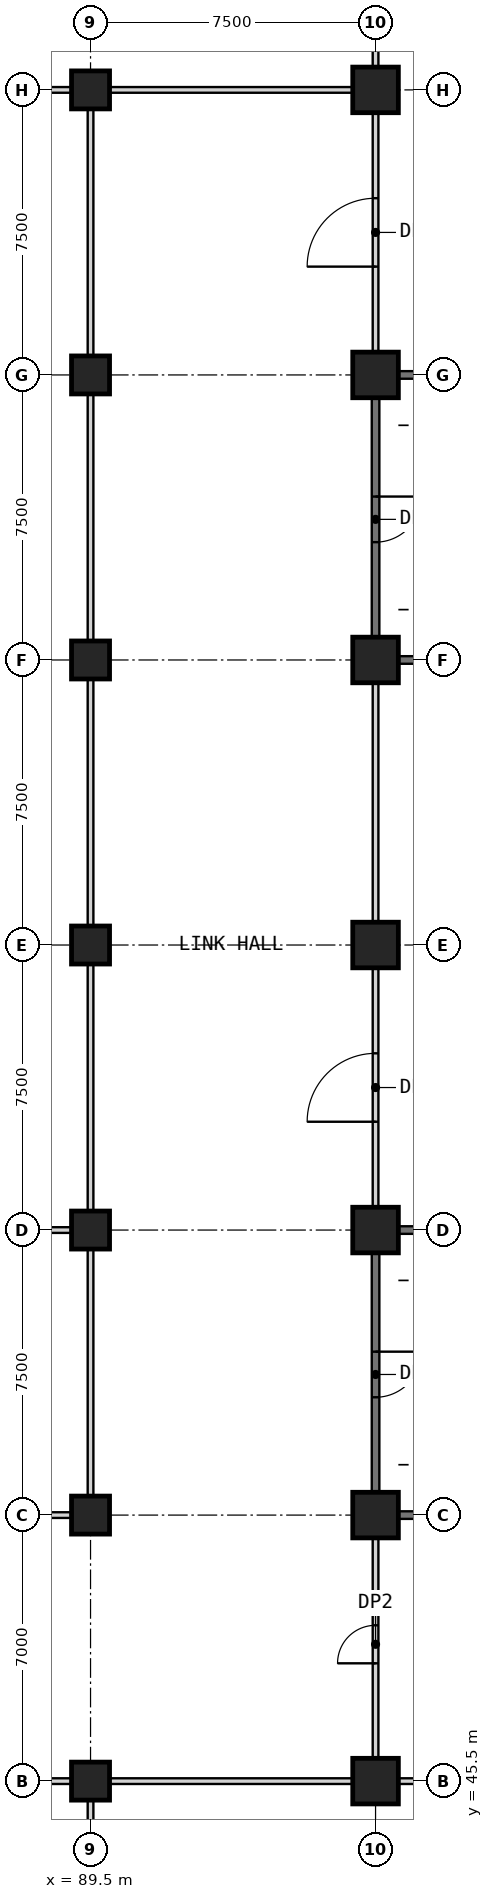
"""IFC4 building model, lengths in metres.
Left out: names, types, materials, properties, quantities, classifications, styles, units other than length and angle.
Written with IfcOpenShell. Run it as: python <this file> out.ifc"""

import sys

from ifc_helpers import new_model, si_unit, direction, frame, frame_2d, origin, origin_2d, place, context, subcontext, project, spatial, rectangle, extrude, element, fill, save


model = new_model("IFC4")
c1 = context("Model", 3, precision=1e-05, world=origin(), true_north=direction((0.0, 1.0)))
c2 = subcontext(c1, "Body", "Model", "MODEL_VIEW")
j1 = project(units=[si_unit("LENGTHUNIT", "METRE"), si_unit("PLANEANGLEUNIT", "RADIAN")], contexts=[c1])
p1 = place(None, origin())
s1 = spatial("IfcSite", under=j1, at=p1, CompositionType="ELEMENT")
p2 = place(p1, origin())
s2 = spatial("IfcBuilding", under=s1, at=p2, CompositionType="ELEMENT")
p3 = place(p2, frame((0.0, 0.0, 29.0)))
s3 = spatial("IfcBuildingStorey", under=s2, at=p3, CompositionType="ELEMENT", Elevation=29.0)
for number, where, z_axis, x_axis in (
    (1, (89.5, 45.5, 0.0), (0.0, 0.0, 1.0), (1.0, 0.0, 0.0)),
    (2, (89.5, 52.5, 0.0), (0.0, 0.0, 1.0), (1.0, 0.0, 0.0)),
    (3, (89.5, 60.0, 0.0), (0.0, 0.0, 1.0), (1.0, 0.0, 0.0)),
    (4, (89.5, 67.5, 0.0), (0.0, 0.0, 1.0), (1.0, 0.0, 0.0)),
    (5, (89.5, 75.0, 0.0), (0.0, 0.0, 1.0), (1.0, 0.0, 0.0)),
    (6, (89.5, 82.5, 0.0), (0.0, 0.0, 1.0), (1.0, 0.0, 0.0)),
    (7, (89.5, 90.0, 0.0), (0.0, 0.0, 1.0), (1.0, 0.0, 0.0)),
):
    element("IfcColumn", number, at=place(p3, frame(where, z_axis=z_axis, x_axis=x_axis)), inside=s3, PredefinedType="COLUMN", context=c2, shape_type="SweptSolid", body=[
        extrude(rectangle(XDim=1.0, YDim=1.0, at=origin_2d()), origin(), (0.0, 0.0, 1.0), 5.0),
    ])
for number, where, z_axis, x_axis in (
    (8, (97.0, 45.5, 0.0), (0.0, 0.0, 1.0), (1.0, 0.0, 0.0)),
    (9, (97.0, 52.5, 0.0), (0.0, 0.0, 1.0), (1.0, 0.0, 0.0)),
    (10, (97.0, 60.0, 0.0), (0.0, 0.0, 1.0), (1.0, 0.0, 0.0)),
    (11, (97.0, 67.5, 0.0), (0.0, 0.0, 1.0), (1.0, 0.0, 0.0)),
    (12, (97.0, 75.0, 0.0), (0.0, 0.0, 1.0), (1.0, 0.0, 0.0)),
    (13, (97.0, 82.5, 0.0), (0.0, 0.0, 1.0), (1.0, 0.0, 0.0)),
    (14, (97.0, 90.0, 0.0), (0.0, 0.0, 1.0), (1.0, 0.0, 0.0)),
):
    element("IfcColumn", number, at=place(p3, frame(where, z_axis=z_axis, x_axis=x_axis)), inside=s3, PredefinedType="COLUMN", context=c2, shape_type="SweptSolid", body=[
        extrude(rectangle(XDim=1.2, YDim=1.2, at=origin_2d()), origin(), (0.0, 0.0, 1.0), 5.0),
    ])
for number, where, z_axis, x_axis in (
    (15, (82.6, 45.5, 0.0), (0.0, 0.0, 1.0), (1.0, 0.0, 0.0)),
    (16, (90.0, 45.5, 0.0), (0.0, 0.0, 1.0), (1.0, 0.0, 0.0)),
):
    element("IfcWall", number, at=place(p3, frame(where, z_axis=z_axis, x_axis=x_axis)), inside=s3, PredefinedType="PARTITIONING", context=c2, shape_type="SweptSolid", body=[
        extrude(rectangle(XDim=6.4, YDim=0.15, at=frame_2d((3.2, 0.0))), origin(), (0.0, 0.0, 1.0), 4.7),
    ])
p4 = place(p3, frame((97.6, 45.5, 0.0), z_axis=(0.0, 0.0, 1.0), x_axis=(1.0, 0.0, 0.0)))
e17 = element("IfcWall", 17, at=p4, inside=s3, PredefinedType="PARTITIONING", context=c2, shape_type="SweptSolid", body=[
    extrude(rectangle(XDim=6.3, YDim=0.15, at=frame_2d((3.15, 0.0))), origin(), (0.0, 0.0, 1.0), 4.7),
])
p5 = place(p4, frame((2.25, 0.0, 0.0)))
e18 = element("IfcOpeningElement", 18, at=p5, cuts=e17, PredefinedType="OPENING", context=c2, shape_type="SweptSolid", body=[
    extrude(rectangle(XDim=1.8, YDim=2.4, at=frame_2d((0.9, 1.2))), frame((0.0, 0.085, 0.0), z_axis=(0.0, -1.0, 0.0), x_axis=(1.0, 0.0, 0.0)), (0.0, 0.0, 1.0), 0.17),
])
p6 = place(p3, frame((89.0, 52.5, 0.0), z_axis=(0.0, 0.0, 1.0), x_axis=(-1.0, 0.0, 0.0)))
e19 = element("IfcWall", 19, at=p6, inside=s3, PredefinedType="PARTITIONING", context=c2, shape_type="SweptSolid", body=[
    extrude(rectangle(XDim=6.4, YDim=0.15, at=frame_2d((3.2, 0.0))), origin(), (0.0, 0.0, 1.0), 4.7),
])
p7 = place(p6, frame((2.35, 0.0, 0.0)))
e20 = element("IfcOpeningElement", 20, at=p7, cuts=e19, PredefinedType="OPENING", context=c2, shape_type="SweptSolid", body=[
    extrude(rectangle(XDim=1.8, YDim=2.4, at=frame_2d((0.9, 1.2))), frame((0.0, 0.085, 0.0), z_axis=(0.0, -1.0, 0.0), x_axis=(1.0, 0.0, 0.0)), (0.0, 0.0, 1.0), 0.17),
])
p8 = place(p3, frame((97.6, 52.5, 0.0), z_axis=(0.0, 0.0, 1.0), x_axis=(1.0, 0.0, 0.0)))
e21 = element("IfcWall", 21, at=p8, inside=s3, PredefinedType="SHEAR", context=c2, shape_type="SweptSolid", body=[
    extrude(rectangle(XDim=6.3, YDim=0.2, at=frame_2d((3.15, 0.0))), origin(), (0.0, 0.0, 1.0), 4.7),
])
p9 = place(p3, frame((82.6, 60.0, 0.0), z_axis=(0.0, 0.0, 1.0), x_axis=(1.0, 0.0, 0.0)))
e22 = element("IfcWall", 22, at=p9, inside=s3, PredefinedType="PARTITIONING", context=c2, shape_type="SweptSolid", body=[
    extrude(rectangle(XDim=6.4, YDim=0.15, at=frame_2d((3.2, 0.0))), origin(), (0.0, 0.0, 1.0), 4.7),
])
for number, where, z_axis, x_axis in (
    (23, (97.6, 60.0, 0.0), (0.0, 0.0, 1.0), (1.0, 0.0, 0.0)),
    (24, (97.6, 75.0, 0.0), (0.0, 0.0, 1.0), (1.0, 0.0, 0.0)),
    (25, (97.6, 82.5, 0.0), (0.0, 0.0, 1.0), (1.0, 0.0, 0.0)),
):
    element("IfcWall", number, at=place(p3, frame(where, z_axis=z_axis, x_axis=x_axis)), inside=s3, PredefinedType="SHEAR", context=c2, shape_type="SweptSolid", body=[
        extrude(rectangle(XDim=6.3, YDim=0.2, at=frame_2d((3.15, 0.0))), origin(), (0.0, 0.0, 1.0), 4.7),
    ])
for number, where, z_axis, x_axis in (
    (26, (82.6, 90.0, 0.0), (0.0, 0.0, 1.0), (1.0, 0.0, 0.0)),
    (27, (90.0, 90.0, 0.0), (0.0, 0.0, 1.0), (1.0, 0.0, 0.0)),
):
    element("IfcWall", number, at=place(p3, frame(where, z_axis=z_axis, x_axis=x_axis)), inside=s3, PredefinedType="PARTITIONING", context=c2, shape_type="SweptSolid", body=[
        extrude(rectangle(XDim=6.4, YDim=0.15, at=frame_2d((3.2, 0.0))), origin(), (0.0, 0.0, 1.0), 4.7),
    ])
p10 = place(p3, frame((97.0, 46.1, 0.0), z_axis=(0.0, 0.0, 1.0), x_axis=(0.0, 1.0, 0.0)))
e28 = element("IfcWall", 28, at=p10, inside=s3, PredefinedType="PARTITIONING", context=c2, shape_type="SweptSolid", body=[
    extrude(rectangle(XDim=5.8, YDim=0.15, at=frame_2d((2.9, 0.0))), origin(), (0.0, 0.0, 1.0), 4.7),
])
p11 = place(p10, frame((2.5, 0.0, 0.0)))
e29 = element("IfcOpeningElement", 29, at=p11, cuts=e28, PredefinedType="OPENING", context=c2, shape_type="SweptSolid", body=[
    extrude(rectangle(XDim=1.0, YDim=2.1, at=frame_2d((0.5, 1.05))), frame((0.0, 0.085, 0.0), z_axis=(0.0, -1.0, 0.0), x_axis=(1.0, 0.0, 0.0)), (0.0, 0.0, 1.0), 0.17),
])
p12 = place(p3, frame((97.0, 59.4, 0.0), z_axis=(0.0, 0.0, 1.0), x_axis=(0.0, -1.0, 0.0)))
e30 = element("IfcWall", 30, at=p12, inside=s3, PredefinedType="SHEAR", context=c2, shape_type="SweptSolid", body=[
    extrude(rectangle(XDim=6.3, YDim=0.2, at=frame_2d((3.15, 0.0))), origin(), (0.0, 0.0, 1.0), 4.7),
])
p13 = place(p12, frame((2.6, 0.0, 0.0)))
e31 = element("IfcOpeningElement", 31, at=p13, cuts=e30, PredefinedType="OPENING", context=c2, shape_type="SweptSolid", body=[
    extrude(rectangle(XDim=1.2, YDim=2.1, at=frame_2d((0.6, 1.05))), frame((0.0, 0.11, 0.0), z_axis=(0.0, -1.0, 0.0), x_axis=(1.0, 0.0, 0.0)), (0.0, 0.0, 1.0), 0.22),
])
p14 = place(p3, frame((97.0, 60.6, 0.0), z_axis=(0.0, 0.0, 1.0), x_axis=(0.0, 1.0, 0.0)))
e32 = element("IfcWall", 32, at=p14, inside=s3, PredefinedType="PARTITIONING", context=c2, shape_type="SweptSolid", body=[
    extrude(rectangle(XDim=6.3, YDim=0.15, at=frame_2d((3.15, 0.0))), origin(), (0.0, 0.0, 1.0), 4.7),
])
p15 = place(p14, frame((2.25, 0.0, 0.0)))
e33 = element("IfcOpeningElement", 33, at=p15, cuts=e32, PredefinedType="OPENING", context=c2, shape_type="SweptSolid", body=[
    extrude(rectangle(XDim=1.8, YDim=2.4, at=frame_2d((0.9, 1.2))), frame((0.0, 0.085, 0.0), z_axis=(0.0, -1.0, 0.0), x_axis=(1.0, 0.0, 0.0)), (0.0, 0.0, 1.0), 0.17),
])
p16 = place(p3, frame((97.0, 68.1, 0.0), z_axis=(0.0, 0.0, 1.0), x_axis=(0.0, 1.0, 0.0)))
e34 = element("IfcWall", 34, at=p16, inside=s3, PredefinedType="PARTITIONING", context=c2, shape_type="SweptSolid", body=[
    extrude(rectangle(XDim=6.3, YDim=0.15, at=frame_2d((3.15, 0.0))), origin(), (0.0, 0.0, 1.0), 4.7),
])
p17 = place(p3, frame((97.0, 81.9, 0.0), z_axis=(0.0, 0.0, 1.0), x_axis=(0.0, -1.0, 0.0)))
e35 = element("IfcWall", 35, at=p17, inside=s3, PredefinedType="SHEAR", context=c2, shape_type="SweptSolid", body=[
    extrude(rectangle(XDim=6.3, YDim=0.2, at=frame_2d((3.15, 0.0))), origin(), (0.0, 0.0, 1.0), 4.7),
])
p18 = place(p17, frame((2.6, 0.0, 0.0)))
e36 = element("IfcOpeningElement", 36, at=p18, cuts=e35, PredefinedType="OPENING", context=c2, shape_type="SweptSolid", body=[
    extrude(rectangle(XDim=1.2, YDim=2.1, at=frame_2d((0.6, 1.05))), frame((0.0, 0.11, 0.0), z_axis=(0.0, -1.0, 0.0), x_axis=(1.0, 0.0, 0.0)), (0.0, 0.0, 1.0), 0.22),
])
p19 = place(p3, frame((97.0, 83.1, 0.0), z_axis=(0.0, 0.0, 1.0), x_axis=(0.0, 1.0, 0.0)))
e37 = element("IfcWall", 37, at=p19, inside=s3, PredefinedType="PARTITIONING", context=c2, shape_type="SweptSolid", body=[
    extrude(rectangle(XDim=6.3, YDim=0.15, at=frame_2d((3.15, 0.0))), origin(), (0.0, 0.0, 1.0), 4.7),
])
p20 = place(p19, frame((2.25, 0.0, 0.0)))
e38 = element("IfcOpeningElement", 38, at=p20, cuts=e37, PredefinedType="OPENING", context=c2, shape_type="SweptSolid", body=[
    extrude(rectangle(XDim=1.8, YDim=2.4, at=frame_2d((0.9, 1.2))), frame((0.0, 0.085, 0.0), z_axis=(0.0, -1.0, 0.0), x_axis=(1.0, 0.0, 0.0)), (0.0, 0.0, 1.0), 0.17),
])
p21 = place(p3, frame((97.0, 90.6, 0.0), z_axis=(0.0, 0.0, 1.0), x_axis=(0.0, 1.0, 0.0)))
e39 = element("IfcWall", 39, at=p21, inside=s3, PredefinedType="PARTITIONING", context=c2, shape_type="SweptSolid", body=[
    extrude(rectangle(XDim=5.8, YDim=0.15, at=frame_2d((2.9, 0.0))), origin(), (0.0, 0.0, 1.0), 4.7),
])
p22 = place(p3, frame((89.5, 38.6, 0.0), z_axis=(0.0, 0.0, 1.0), x_axis=(0.0, 1.0, 0.0)))
e40 = element("IfcWall", 40, at=p22, inside=s3, PredefinedType="PARTITIONING", context=c2, shape_type="SweptSolid", body=[
    extrude(rectangle(XDim=6.4, YDim=0.15, at=frame_2d((3.2, 0.0))), origin(), (0.0, 0.0, 1.0), 4.7),
])
for number, where, z_axis, x_axis in (
    (41, (89.5, 53.0, 0.0), (0.0, 0.0, 1.0), (0.0, 1.0, 0.0)),
    (42, (89.5, 60.5, 0.0), (0.0, 0.0, 1.0), (0.0, 1.0, 0.0)),
    (43, (89.5, 68.0, 0.0), (0.0, 0.0, 1.0), (0.0, 1.0, 0.0)),
    (44, (89.5, 75.5, 0.0), (0.0, 0.0, 1.0), (0.0, 1.0, 0.0)),
    (45, (89.5, 83.0, 0.0), (0.0, 0.0, 1.0), (0.0, 1.0, 0.0)),
):
    element("IfcWall", number, at=place(p3, frame(where, z_axis=z_axis, x_axis=x_axis)), inside=s3, PredefinedType="PARTITIONING", context=c2, shape_type="SweptSolid", body=[
        extrude(rectangle(XDim=6.5, YDim=0.15, at=frame_2d((3.25, 0.0))), origin(), (0.0, 0.0, 1.0), 4.25),
    ])
p23 = place(p11, origin())
e46 = element("IfcDoor", 46, at=p23, inside=s3, OperationType="SINGLE_SWING_LEFT", PredefinedType="DOOR", context=c2, shape_type="SweptSolid", body=[
    extrude(rectangle(XDim=1.0, YDim=2.1, at=frame_2d((0.5, 1.05))), frame((0.0, 0.025, 0.0), z_axis=(0.0, -1.0, 0.0), x_axis=(1.0, 0.0, 0.0)), (0.0, 0.0, 1.0), 0.05),
])
fill(e29, e46)
p24 = place(p13, origin())
e47 = element("IfcDoor", 47, at=p24, inside=s3, OperationType="SINGLE_SWING_LEFT", PredefinedType="DOOR", context=c2, shape_type="SweptSolid", body=[
    extrude(rectangle(XDim=1.2, YDim=2.1, at=frame_2d((0.6, 1.05))), frame((0.0, 0.025, 0.0), z_axis=(0.0, -1.0, 0.0), x_axis=(1.0, 0.0, 0.0)), (0.0, 0.0, 1.0), 0.05),
])
fill(e31, e47)
p25 = place(p15, origin())
e48 = element("IfcDoor", 48, at=p25, inside=s3, OperationType="SINGLE_SWING_LEFT", PredefinedType="DOOR", context=c2, shape_type="SweptSolid", body=[
    extrude(rectangle(XDim=1.8, YDim=2.4, at=frame_2d((0.9, 1.2))), frame((0.0, 0.025, 0.0), z_axis=(0.0, -1.0, 0.0), x_axis=(1.0, 0.0, 0.0)), (0.0, 0.0, 1.0), 0.05),
])
fill(e33, e48)
p26 = place(p18, origin())
e49 = element("IfcDoor", 49, at=p26, inside=s3, OperationType="SINGLE_SWING_LEFT", PredefinedType="DOOR", context=c2, shape_type="SweptSolid", body=[
    extrude(rectangle(XDim=1.2, YDim=2.1, at=frame_2d((0.6, 1.05))), frame((0.0, 0.025, 0.0), z_axis=(0.0, -1.0, 0.0), x_axis=(1.0, 0.0, 0.0)), (0.0, 0.0, 1.0), 0.05),
])
fill(e36, e49)
p27 = place(p20, origin())
e50 = element("IfcDoor", 50, at=p27, inside=s3, OperationType="SINGLE_SWING_LEFT", PredefinedType="DOOR", context=c2, shape_type="SweptSolid", body=[
    extrude(rectangle(XDim=1.8, YDim=2.4, at=frame_2d((0.9, 1.2))), frame((0.0, 0.025, 0.0), z_axis=(0.0, -1.0, 0.0), x_axis=(1.0, 0.0, 0.0)), (0.0, 0.0, 1.0), 0.05),
])
fill(e38, e50)
save(model, sys.argv[1])
